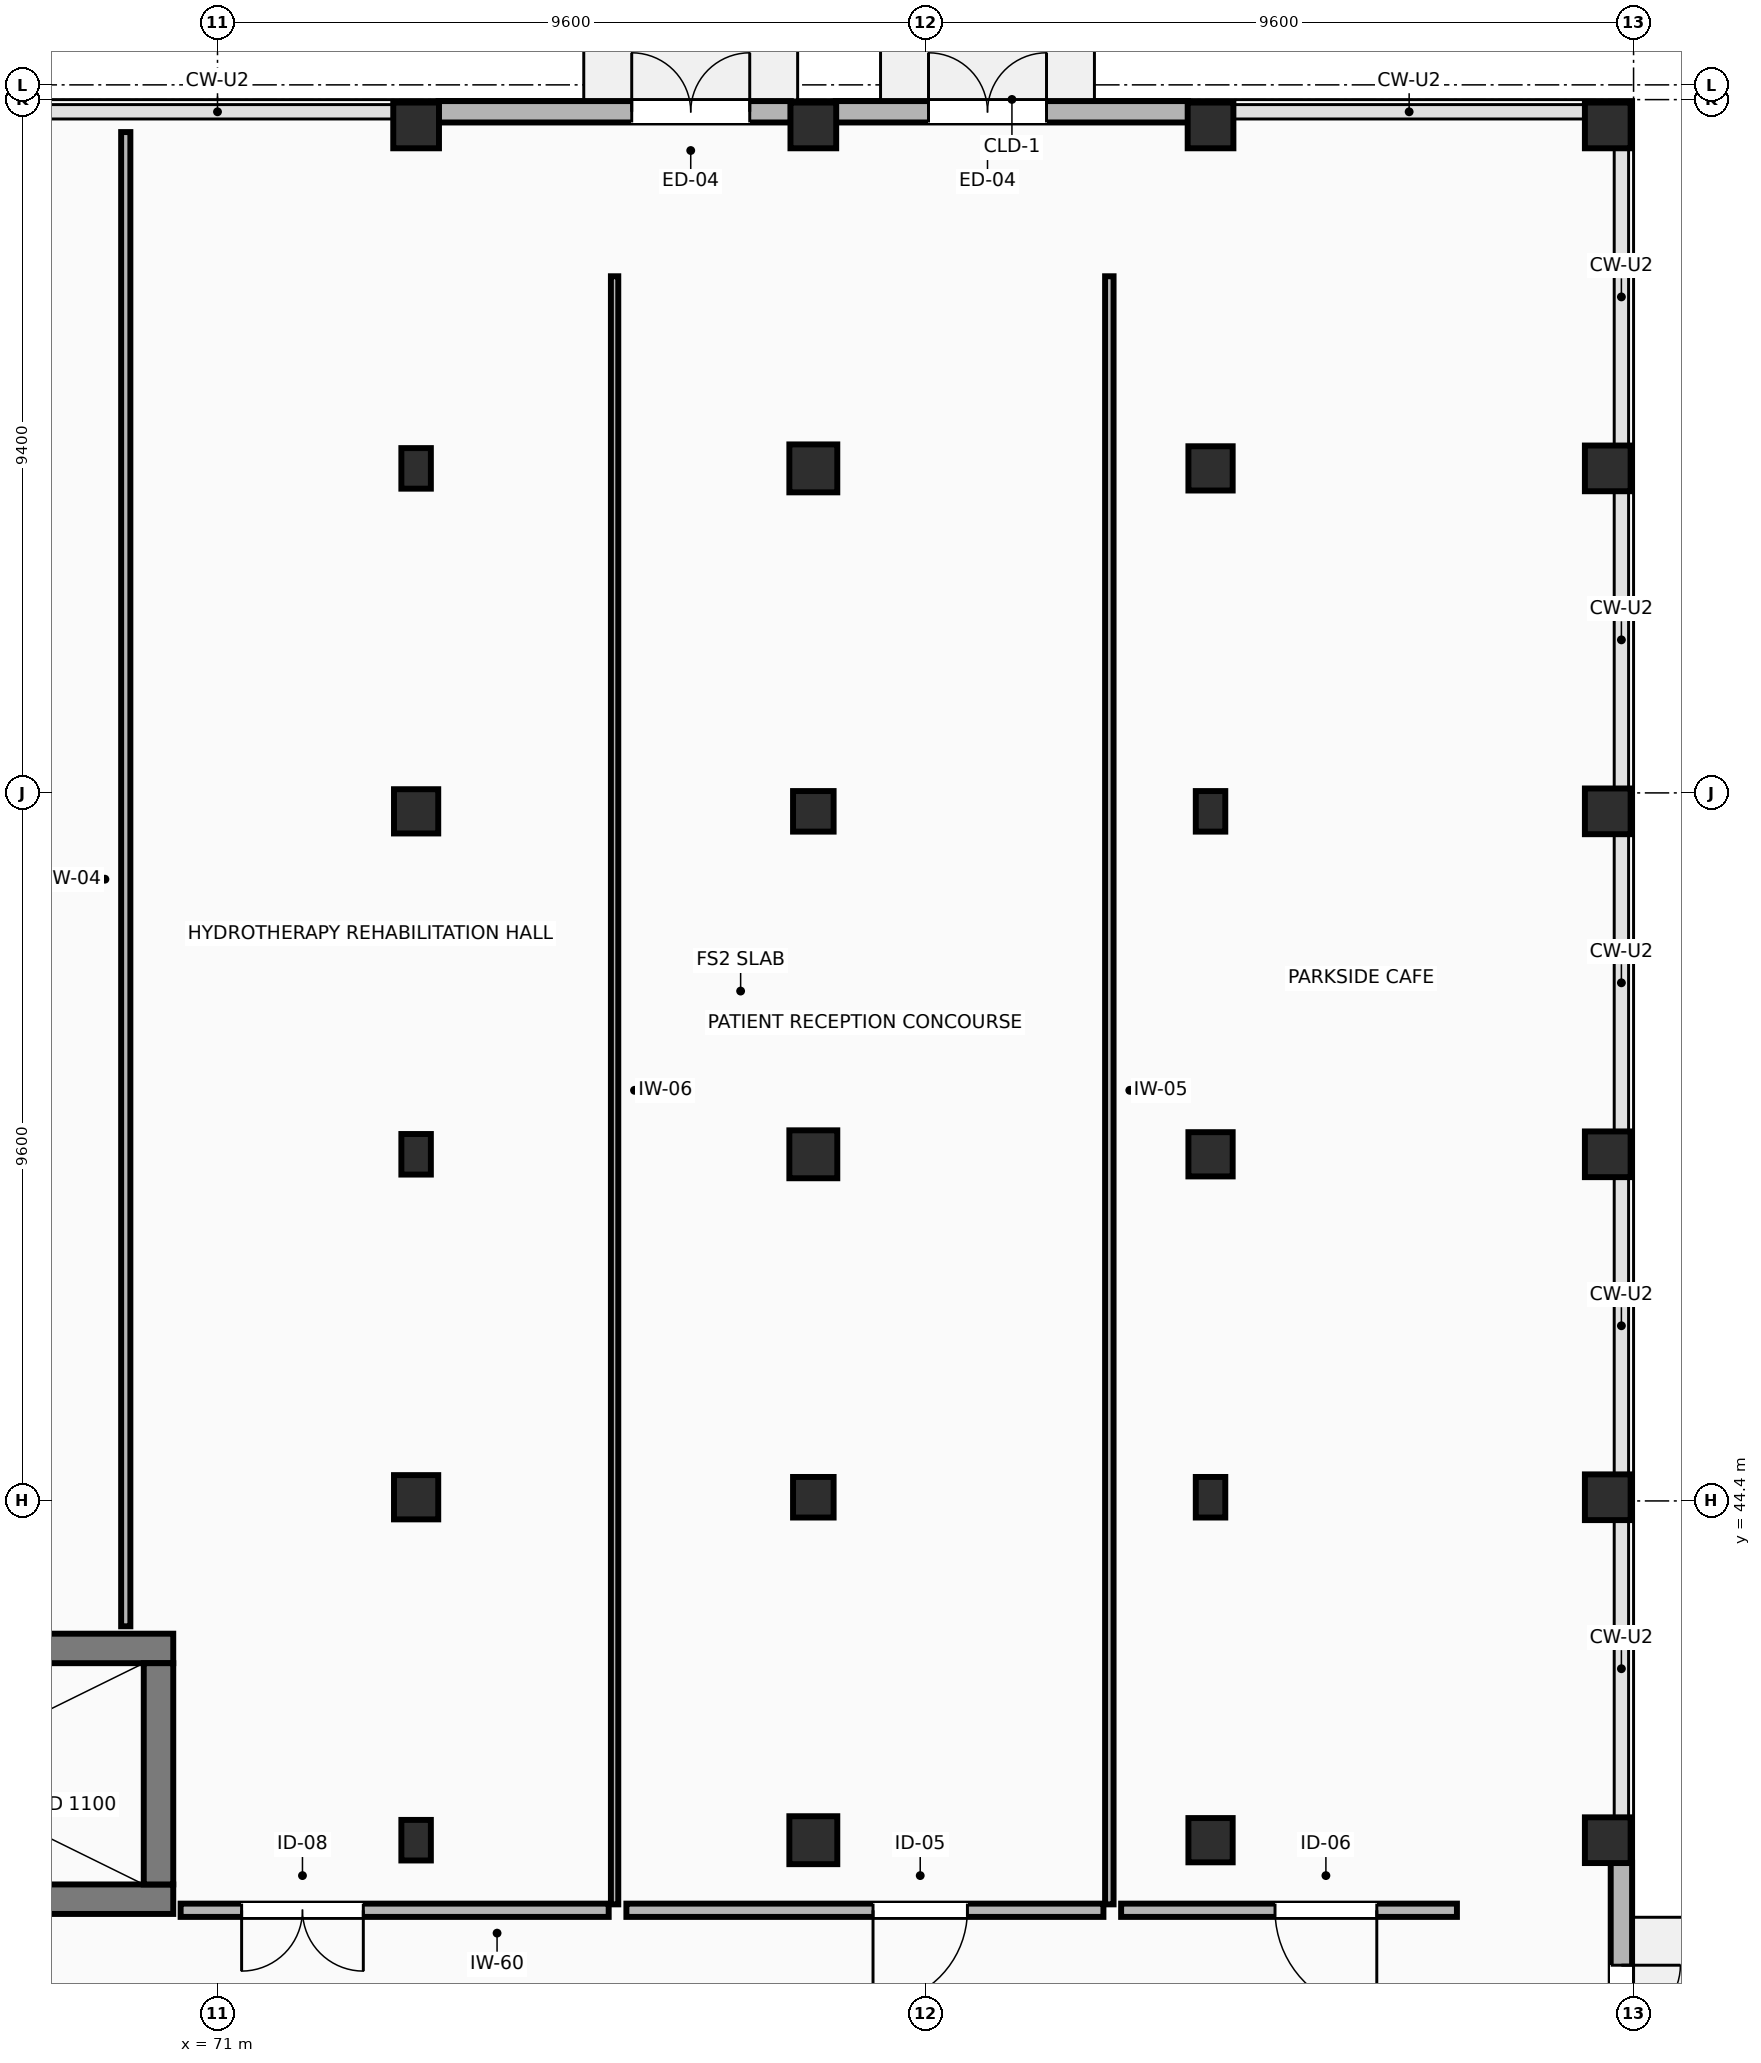
"""IFC4 building model, lengths in metres.
Left out: names, types, materials, properties, quantities, classifications, styles, units other than length and angle.
Written with IfcOpenShell. Run it as: python <this file> out.ifc"""

import sys

from ifc_helpers import new_model, si_unit, direction, frame, frame_2d, origin, origin_2d, place, context, subcontext, project, spatial, rectangle, circle, extrude, element, fill, save


model = new_model("IFC4")
c1 = context("Model", 3, precision=1e-05, world=origin(), true_north=direction((0.0, 1.0)))
c2 = subcontext(c1, "Body", "Model", "MODEL_VIEW")
j1 = project(units=[si_unit("LENGTHUNIT", "METRE"), si_unit("PLANEANGLEUNIT", "RADIAN")], contexts=[c1])
p1 = place(None, origin())
s1 = spatial("IfcSite", under=j1, at=p1, CompositionType="ELEMENT")
p2 = place(p1, origin())
s2 = spatial("IfcBuilding", under=s1, at=p2, CompositionType="ELEMENT")
p3 = place(p2, origin())
s3 = spatial("IfcBuildingStorey", under=s2, at=p3, CompositionType="ELEMENT", Elevation=0.0)
p4 = place(p3, frame((73.693, 39.8, 0.0), z_axis=(0.0, 0.0, 1.0), x_axis=(1.0, 0.0, 0.0)))
e1 = element("IfcColumn", 1, at=p4, inside=s3, PredefinedType="COLUMN", context=c2, shape_type="SweptSolid", body=[
    extrude(rectangle(XDim=0.4, YDim=0.55, at=origin_2d()), origin(), (0.0, 0.0, 1.0), 5.4),
])
p5 = place(p3, frame((73.693, 44.45, 0.0), z_axis=(0.0, 0.0, 1.0), x_axis=(1.0, 0.0, 0.0)))
e2 = element("IfcColumn", 2, at=p5, inside=s3, PredefinedType="COLUMN", context=c2, shape_type="SweptSolid", body=[
    extrude(rectangle(XDim=0.6, YDim=0.6, at=origin_2d()), origin(), (0.0, 0.0, 1.0), 5.4),
])
p6 = place(p3, frame((73.693, 49.1, 0.0), z_axis=(0.0, 0.0, 1.0), x_axis=(1.0, 0.0, 0.0)))
e3 = element("IfcColumn", 3, at=p6, inside=s3, PredefinedType="COLUMN", context=c2, shape_type="SweptSolid", body=[
    extrude(rectangle(XDim=0.4, YDim=0.55, at=origin_2d()), origin(), (0.0, 0.0, 1.0), 5.4),
])
p7 = place(p3, frame((73.693, 53.75, 0.0), z_axis=(0.0, 0.0, 1.0), x_axis=(1.0, 0.0, 0.0)))
e4 = element("IfcColumn", 4, at=p7, inside=s3, PredefinedType="COLUMN", context=c2, shape_type="SweptSolid", body=[
    extrude(rectangle(XDim=0.6, YDim=0.6, at=origin_2d()), origin(), (0.0, 0.0, 1.0), 5.4),
])
p8 = place(p3, frame((73.693, 58.4, 0.0), z_axis=(0.0, 0.0, 1.0), x_axis=(1.0, 0.0, 0.0)))
e5 = element("IfcColumn", 5, at=p8, inside=s3, PredefinedType="COLUMN", context=c2, shape_type="SweptSolid", body=[
    extrude(rectangle(XDim=0.4, YDim=0.55, at=origin_2d()), origin(), (0.0, 0.0, 1.0), 5.4),
])
p9 = place(p3, frame((73.693, 63.05, 0.0), z_axis=(0.0, 0.0, 1.0), x_axis=(1.0, 0.0, 0.0)))
e6 = element("IfcColumn", 6, at=p9, inside=s3, PredefinedType="COLUMN", context=c2, shape_type="SweptSolid", body=[
    extrude(circle(Radius=0.31, at=origin_2d()), origin(), (0.0, 0.0, 1.0), 5.4),
])
p10 = place(p3, frame((79.079, 39.8, 0.0), z_axis=(0.0, 0.0, 1.0), x_axis=(1.0, 0.0, 0.0)))
e7 = element("IfcColumn", 7, at=p10, inside=s3, PredefinedType="COLUMN", context=c2, shape_type="SweptSolid", body=[
    extrude(rectangle(XDim=0.65, YDim=0.65, at=origin_2d()), origin(), (0.0, 0.0, 1.0), 5.4),
])
p11 = place(p3, frame((79.079, 44.45, 0.0), z_axis=(0.0, 0.0, 1.0), x_axis=(1.0, 0.0, 0.0)))
e8 = element("IfcColumn", 8, at=p11, inside=s3, PredefinedType="COLUMN", context=c2, shape_type="SweptSolid", body=[
    extrude(rectangle(XDim=0.55, YDim=0.55, at=origin_2d()), origin(), (0.0, 0.0, 1.0), 5.4),
])
p12 = place(p3, frame((79.079, 49.1, 0.0), z_axis=(0.0, 0.0, 1.0), x_axis=(1.0, 0.0, 0.0)))
e9 = element("IfcColumn", 9, at=p12, inside=s3, PredefinedType="COLUMN", context=c2, shape_type="SweptSolid", body=[
    extrude(rectangle(XDim=0.65, YDim=0.65, at=origin_2d()), origin(), (0.0, 0.0, 1.0), 5.4),
])
p13 = place(p3, frame((79.079, 53.75, 0.0), z_axis=(0.0, 0.0, 1.0), x_axis=(1.0, 0.0, 0.0)))
e10 = element("IfcColumn", 10, at=p13, inside=s3, PredefinedType="COLUMN", context=c2, shape_type="SweptSolid", body=[
    extrude(rectangle(XDim=0.55, YDim=0.55, at=origin_2d()), origin(), (0.0, 0.0, 1.0), 5.4),
])
p14 = place(p3, frame((79.079, 58.4, 0.0), z_axis=(0.0, 0.0, 1.0), x_axis=(1.0, 0.0, 0.0)))
e11 = element("IfcColumn", 11, at=p14, inside=s3, PredefinedType="COLUMN", context=c2, shape_type="SweptSolid", body=[
    extrude(rectangle(XDim=0.65, YDim=0.65, at=origin_2d()), origin(), (0.0, 0.0, 1.0), 5.4),
])
p15 = place(p3, frame((79.079, 63.05, 0.0), z_axis=(0.0, 0.0, 1.0), x_axis=(1.0, 0.0, 0.0)))
e12 = element("IfcColumn", 12, at=p15, inside=s3, PredefinedType="COLUMN", context=c2, shape_type="SweptSolid", body=[
    extrude(circle(Radius=0.31, at=origin_2d()), origin(), (0.0, 0.0, 1.0), 5.4),
])
p16 = place(p3, frame((84.464, 39.8, 0.0), z_axis=(0.0, 0.0, 1.0), x_axis=(1.0, 0.0, 0.0)))
e13 = element("IfcColumn", 13, at=p16, inside=s3, PredefinedType="COLUMN", context=c2, shape_type="SweptSolid", body=[
    extrude(rectangle(XDim=0.6, YDim=0.6, at=origin_2d()), origin(), (0.0, 0.0, 1.0), 5.4),
])
p17 = place(p3, frame((84.464, 44.45, 0.0), z_axis=(0.0, 0.0, 1.0), x_axis=(1.0, 0.0, 0.0)))
e14 = element("IfcColumn", 14, at=p17, inside=s3, PredefinedType="COLUMN", context=c2, shape_type="SweptSolid", body=[
    extrude(rectangle(XDim=0.4, YDim=0.55, at=origin_2d()), origin(), (0.0, 0.0, 1.0), 5.4),
])
p18 = place(p3, frame((84.464, 49.1, 0.0), z_axis=(0.0, 0.0, 1.0), x_axis=(1.0, 0.0, 0.0)))
e15 = element("IfcColumn", 15, at=p18, inside=s3, PredefinedType="COLUMN", context=c2, shape_type="SweptSolid", body=[
    extrude(rectangle(XDim=0.6, YDim=0.6, at=origin_2d()), origin(), (0.0, 0.0, 1.0), 5.4),
])
p19 = place(p3, frame((84.464, 53.75, 0.0), z_axis=(0.0, 0.0, 1.0), x_axis=(1.0, 0.0, 0.0)))
e16 = element("IfcColumn", 16, at=p19, inside=s3, PredefinedType="COLUMN", context=c2, shape_type="SweptSolid", body=[
    extrude(rectangle(XDim=0.4, YDim=0.55, at=origin_2d()), origin(), (0.0, 0.0, 1.0), 5.4),
])
p20 = place(p3, frame((84.464, 58.4, 0.0), z_axis=(0.0, 0.0, 1.0), x_axis=(1.0, 0.0, 0.0)))
e17 = element("IfcColumn", 17, at=p20, inside=s3, PredefinedType="COLUMN", context=c2, shape_type="SweptSolid", body=[
    extrude(rectangle(XDim=0.6, YDim=0.6, at=origin_2d()), origin(), (0.0, 0.0, 1.0), 5.4),
])
for number, where, z_axis, x_axis in (
    (18, (84.464, 63.05, 0.0), (0.0, 0.0, 1.0), (1.0, 0.0, 0.0)),
    (19, (89.85, 39.8, 0.0), (0.0, 0.0, 1.0), (1.0, 0.0, 0.0)),
    (20, (89.85, 44.45, 0.0), (0.0, 0.0, 1.0), (1.0, 0.0, 0.0)),
    (21, (89.85, 49.1, 0.0), (0.0, 0.0, 1.0), (1.0, 0.0, 0.0)),
    (22, (89.85, 53.75, 0.0), (0.0, 0.0, 1.0), (1.0, 0.0, 0.0)),
    (23, (89.85, 58.4, 0.0), (0.0, 0.0, 1.0), (1.0, 0.0, 0.0)),
    (24, (89.85, 63.05, 0.0), (0.0, 0.0, 1.0), (1.0, 0.0, 0.0)),
):
    element("IfcColumn", number, at=place(p3, frame(where, z_axis=z_axis, x_axis=x_axis)), inside=s3, PredefinedType="COLUMN", context=c2, shape_type="SweptSolid", body=[
        extrude(circle(Radius=0.31, at=origin_2d()), origin(), (0.0, 0.0, 1.0), 5.4),
    ])
p21 = place(p3, frame((90.035, 35.455, 0.0), z_axis=(0.0, 0.0, 1.0), x_axis=(0.0, 1.0, 0.0)))
e25 = element("IfcWall", 25, at=p21, inside=s3, PredefinedType="STANDARD", context=c2, shape_type="SweptSolid", body=[
    extrude(rectangle(XDim=4.04, YDim=0.29, at=frame_2d((2.02, 0.0))), origin(), (0.0, 0.0, 1.0), 4.625),
])
p22 = place(p21, frame((1.05, 0.0, 0.0)))
e26 = element("IfcOpeningElement", 26, at=p22, cuts=e25, PredefinedType="OPENING", context=c2, shape_type="SweptSolid", body=[
    extrude(rectangle(XDim=1.6, YDim=2.25, at=frame_2d((0.8, 1.125))), frame((0.0, 0.155, 0.0), z_axis=(0.0, -1.0, 0.0), x_axis=(1.0, 0.0, 0.0)), (0.0, 0.0, 1.0), 0.31),
])
p23 = place(p3, frame((84.159, 63.235, 0.0), z_axis=(0.0, 0.0, 1.0), x_axis=(-1.0, 0.0, 0.0)))
e27 = element("IfcWall", 27, at=p23, inside=s3, PredefinedType="STANDARD", context=c2, shape_type="SweptSolid", body=[
    extrude(rectangle(XDim=4.776, YDim=0.29, at=frame_2d((2.388, 0.0))), origin(), (0.0, 0.0, 1.0), 4.575),
])
p24 = place(p23, frame((1.919, 0.0, 0.0)))
e28 = element("IfcOpeningElement", 28, at=p24, cuts=e27, PredefinedType="OPENING", context=c2, shape_type="SweptSolid", body=[
    extrude(rectangle(XDim=1.6, YDim=2.25, at=frame_2d((0.8, 1.125))), frame((0.0, 0.155, 0.0), z_axis=(0.0, -1.0, 0.0), x_axis=(1.0, 0.0, 0.0)), (0.0, 0.0, 1.0), 0.31),
])
p25 = place(p3, frame((78.774, 63.235, 0.0), z_axis=(0.0, 0.0, 1.0), x_axis=(-1.0, 0.0, 0.0)))
e29 = element("IfcWall", 29, at=p25, inside=s3, PredefinedType="STANDARD", context=c2, shape_type="SweptSolid", body=[
    extrude(rectangle(XDim=4.776, YDim=0.29, at=frame_2d((2.388, 0.0))), origin(), (0.0, 0.0, 1.0), 4.575),
])
p26 = place(p25, frame((0.557, 0.0, 0.0)))
e30 = element("IfcOpeningElement", 30, at=p26, cuts=e29, PredefinedType="OPENING", context=c2, shape_type="SweptSolid", body=[
    extrude(rectangle(XDim=1.6, YDim=2.25, at=frame_2d((0.8, 1.125))), frame((0.0, 0.155, 0.0), z_axis=(0.0, -1.0, 0.0), x_axis=(1.0, 0.0, 0.0)), (0.0, 0.0, 1.0), 0.31),
])
p27 = place(p3, frame((62.0, 39.0, 0.0), z_axis=(0.0, 0.0, 1.0), x_axis=(1.0, 0.0, 0.0)))
e31 = element("IfcWall", 31, at=p27, inside=s3, PredefinedType="SHEAR", context=c2, shape_type="SweptSolid", body=[
    extrude(rectangle(XDim=8.4, YDim=0.4, at=frame_2d((4.2, 0.0))), origin(), (0.0, 0.0, 1.0), 5.08),
])
p28 = place(p27, frame((0.52, 0.0, 0.0)))
e32 = element("IfcOpeningElement", 32, at=p28, cuts=e31, PredefinedType="OPENING", context=c2, shape_type="SweptSolid", body=[
    extrude(rectangle(XDim=1.25, YDim=2.2, at=frame_2d((0.625, 1.1))), frame((0.0, 0.21, 0.0), z_axis=(0.0, -1.0, 0.0), x_axis=(1.0, 0.0, 0.0)), (0.0, 0.0, 1.0), 0.42),
])
p29 = place(p3, frame((70.4, 42.4, 0.0), z_axis=(0.0, 0.0, 1.0), x_axis=(-1.0, 0.0, 0.0)))
e33 = element("IfcWall", 33, at=p29, inside=s3, PredefinedType="SHEAR", context=c2, shape_type="SweptSolid", body=[
    extrude(rectangle(XDim=8.4, YDim=0.4, at=frame_2d((4.2, 0.0))), origin(), (0.0, 0.0, 1.0), 5.08),
])
p30 = place(p3, frame((70.2, 42.2, 0.0), z_axis=(0.0, 0.0, 1.0), x_axis=(0.0, -1.0, 0.0)))
e34 = element("IfcWall", 34, at=p30, inside=s3, PredefinedType="SHEAR", context=c2, shape_type="SweptSolid", body=[
    extrude(rectangle(XDim=3.0, YDim=0.4, at=frame_2d((1.5, 0.0))), origin(), (0.0, 0.0, 1.0), 5.08),
])
p31 = place(p3, frame((69.756, 42.7, 0.0), z_axis=(0.0, 0.0, 1.0), x_axis=(0.0, 1.0, 0.0)))
e35 = element("IfcWall", 35, at=p31, inside=s3, PredefinedType="PARTITIONING", context=c2, shape_type="SweptSolid", body=[
    extrude(rectangle(XDim=20.26, YDim=0.125, at=frame_2d((10.13, 0.0))), origin(), (0.0, 0.0, 1.0), 5.08),
])
p32 = place(p3, frame((76.384, 61.005, 0.0), z_axis=(0.0, 0.0, 1.0), x_axis=(0.0, -1.0, 0.0)))
e36 = element("IfcWall", 36, at=p32, inside=s3, PredefinedType="PARTITIONING", context=c2, shape_type="SweptSolid", body=[
    extrude(rectangle(XDim=22.075, YDim=0.1, at=frame_2d((11.038, 0.0))), origin(), (0.0, 0.0, 1.0), 4.803),
])
p33 = place(p3, frame((76.304, 38.85, 0.0), z_axis=(0.0, 0.0, 1.0), x_axis=(-1.0, 0.0, 0.0)))
e37 = element("IfcWall", 37, at=p33, inside=s3, PredefinedType="PARTITIONING", context=c2, shape_type="SweptSolid", body=[
    extrude(rectangle(XDim=5.804, YDim=0.18, at=frame_2d((2.902, 0.0))), origin(), (0.0, 0.0, 1.0), 5.08),
])
p34 = place(p33, frame((3.327, 0.0, 0.0)))
e38 = element("IfcOpeningElement", 38, at=p34, cuts=e37, PredefinedType="OPENING", context=c2, shape_type="SweptSolid", body=[
    extrude(rectangle(XDim=1.65, YDim=2.3, at=frame_2d((0.825, 1.15))), frame((0.0, 0.1, 0.0), z_axis=(0.0, -1.0, 0.0), x_axis=(1.0, 0.0, 0.0)), (0.0, 0.0, 1.0), 0.2),
])
p35 = place(p3, frame((83.092, 61.005, 0.0), z_axis=(0.0, 0.0, 1.0), x_axis=(0.0, -1.0, 0.0)))
e39 = element("IfcWall", 39, at=p35, inside=s3, PredefinedType="PARTITIONING", context=c2, shape_type="SweptSolid", body=[
    extrude(rectangle(XDim=22.075, YDim=0.115, at=frame_2d((11.038, 0.0))), origin(), (0.0, 0.0, 1.0), 5.08),
])
p36 = place(p3, frame((83.012, 38.85, 0.0), z_axis=(0.0, 0.0, 1.0), x_axis=(-1.0, 0.0, 0.0)))
e40 = element("IfcWall", 40, at=p36, inside=s3, PredefinedType="PARTITIONING", context=c2, shape_type="SweptSolid", body=[
    extrude(rectangle(XDim=6.468, YDim=0.18, at=frame_2d((3.234, 0.0))), origin(), (0.0, 0.0, 1.0), 5.08),
])
p37 = place(p36, frame((1.844, 0.0, 0.0)))
e41 = element("IfcOpeningElement", 41, at=p37, cuts=e40, PredefinedType="OPENING", context=c2, shape_type="SweptSolid", body=[
    extrude(rectangle(XDim=1.28, YDim=2.25, at=frame_2d((0.64, 1.125))), frame((0.0, 0.1, 0.0), z_axis=(0.0, -1.0, 0.0), x_axis=(1.0, 0.0, 0.0)), (0.0, 0.0, 1.0), 0.2),
])
p38 = place(p3, frame((87.805, 38.85, 0.0), z_axis=(0.0, 0.0, 1.0), x_axis=(-1.0, 0.0, 0.0)))
e42 = element("IfcWall", 42, at=p38, inside=s3, PredefinedType="PARTITIONING", context=c2, shape_type="SweptSolid", body=[
    extrude(rectangle(XDim=4.553, YDim=0.18, at=frame_2d((2.276, 0.0))), origin(), (0.0, 0.0, 1.0), 5.08),
])
p39 = place(p38, frame((1.086, 0.0, 0.0)))
e43 = element("IfcOpeningElement", 43, at=p39, cuts=e42, PredefinedType="OPENING", context=c2, shape_type="SweptSolid", body=[
    extrude(rectangle(XDim=1.38, YDim=2.25, at=frame_2d((0.69, 1.125))), frame((0.0, 0.1, 0.0), z_axis=(0.0, -1.0, 0.0), x_axis=(1.0, 0.0, 0.0)), (0.0, 0.0, 1.0), 0.2),
])
p40 = place(p22, frame((1.6, 0.0, 0.0), z_axis=(0.0, 0.0, 1.0), x_axis=(-1.0, 0.0, 0.0)))
e44 = element("IfcDoor", 44, at=p40, inside=s3, OperationType="DOUBLE_DOOR_SINGLE_SWING", PredefinedType="DOOR", context=c2, shape_type="SweptSolid", body=[
    extrude(rectangle(XDim=1.6, YDim=2.25, at=frame_2d((0.8, 1.125))), frame((0.0, 0.025, 0.0), z_axis=(0.0, -1.0, 0.0), x_axis=(1.0, 0.0, 0.0)), (0.0, 0.0, 1.0), 0.05),
])
fill(e26, e44)
p41 = place(p24, frame((1.6, 0.0, 0.0), z_axis=(0.0, 0.0, 1.0), x_axis=(-1.0, 0.0, 0.0)))
e45 = element("IfcDoor", 45, at=p41, inside=s3, OperationType="DOUBLE_DOOR_SINGLE_SWING", PredefinedType="DOOR", context=c2, shape_type="SweptSolid", body=[
    extrude(rectangle(XDim=1.6, YDim=2.25, at=frame_2d((0.8, 1.125))), frame((0.0, 0.025, 0.0), z_axis=(0.0, -1.0, 0.0), x_axis=(1.0, 0.0, 0.0)), (0.0, 0.0, 1.0), 0.05),
])
fill(e28, e45)
p42 = place(p26, frame((1.6, 0.0, 0.0), z_axis=(0.0, 0.0, 1.0), x_axis=(-1.0, 0.0, 0.0)))
e46 = element("IfcDoor", 46, at=p42, inside=s3, OperationType="DOUBLE_DOOR_SINGLE_SWING", PredefinedType="DOOR", context=c2, shape_type="SweptSolid", body=[
    extrude(rectangle(XDim=1.6, YDim=2.25, at=frame_2d((0.8, 1.125))), frame((0.0, 0.025, 0.0), z_axis=(0.0, -1.0, 0.0), x_axis=(1.0, 0.0, 0.0)), (0.0, 0.0, 1.0), 0.05),
])
fill(e30, e46)
p43 = place(p34, origin())
e47 = element("IfcDoor", 47, at=p43, inside=s3, OperationType="DOUBLE_DOOR_SINGLE_SWING", PredefinedType="DOOR", context=c2, shape_type="SweptSolid", body=[
    extrude(rectangle(XDim=1.65, YDim=2.3, at=frame_2d((0.825, 1.15))), frame((0.0, 0.025, 0.0), z_axis=(0.0, -1.0, 0.0), x_axis=(1.0, 0.0, 0.0)), (0.0, 0.0, 1.0), 0.05),
])
fill(e38, e47)
p44 = place(p37, origin())
e48 = element("IfcDoor", 48, at=p44, inside=s3, OperationType="SINGLE_SWING_RIGHT", PredefinedType="DOOR", context=c2, shape_type="SweptSolid", body=[
    extrude(rectangle(XDim=1.28, YDim=2.25, at=frame_2d((0.64, 1.125))), frame((0.0, 0.025, 0.0), z_axis=(0.0, -1.0, 0.0), x_axis=(1.0, 0.0, 0.0)), (0.0, 0.0, 1.0), 0.05),
])
fill(e41, e48)
p45 = place(p39, origin())
e49 = element("IfcDoor", 49, at=p45, inside=s3, OperationType="SINGLE_SWING_LEFT", PredefinedType="DOOR", context=c2, shape_type="SweptSolid", body=[
    extrude(rectangle(XDim=1.38, YDim=2.25, at=frame_2d((0.69, 1.125))), frame((0.0, 0.025, 0.0), z_axis=(0.0, -1.0, 0.0), x_axis=(1.0, 0.0, 0.0)), (0.0, 0.0, 1.0), 0.05),
])
fill(e43, e49)
save(model, sys.argv[1])
